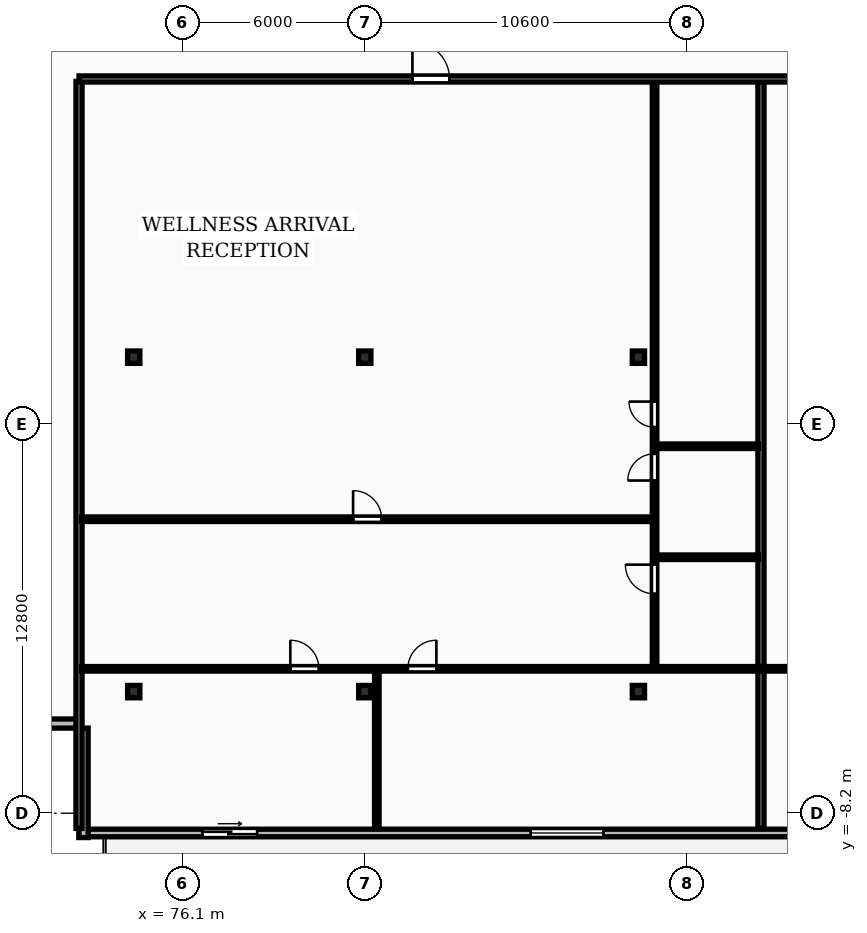
"""IFC4 building model, lengths in metres.
Left out: names, types, materials, properties, quantities, classifications, styles, units other than length and angle.
Written with IfcOpenShell. Run it as: python <this file> out.ifc"""

import sys

from ifc_helpers import new_model, si_unit, direction, frame, frame_2d, origin, origin_2d, place, context, subcontext, project, spatial, rectangle, i_section, extrude, element, fill, save


model = new_model("IFC4")
c1 = context("Model", 3, precision=1e-05, world=origin(), true_north=direction((0.0, 1.0)))
c2 = subcontext(c1, "Body", "Model", "MODEL_VIEW")
j1 = project(units=[si_unit("LENGTHUNIT", "METRE"), si_unit("PLANEANGLEUNIT", "RADIAN")], contexts=[c1])
p1 = place(None, origin())
s1 = spatial("IfcSite", under=j1, at=p1, CompositionType="ELEMENT")
p2 = place(p1, origin())
s2 = spatial("IfcBuilding", under=s1, at=p2, CompositionType="ELEMENT")
p3 = place(p2, frame((0.0, 0.0, 153.7)))
s3 = spatial("IfcBuildingStorey", under=s2, at=p3, CompositionType="ELEMENT", Elevation=153.7)
for number, where, z_axis, x_axis in (
    (1, (74.5, -4.2, 0.0), (0.0, 0.0, 1.0), (1.0, 0.0, 0.0)),
    (2, (74.5, 6.8, 0.0), (0.0, 0.0, 1.0), (1.0, 0.0, 0.0)),
    (3, (82.1, -4.2, 0.0), (0.0, 0.0, 1.0), (1.0, 0.0, 0.0)),
    (4, (82.1, 6.8, 0.0), (0.0, 0.0, 1.0), (1.0, 0.0, 0.0)),
    (5, (91.1, -4.2, 0.0), (0.0, 0.0, 1.0), (1.0, 0.0, 0.0)),
    (6, (91.1, 6.8, 0.0), (0.0, 0.0, 1.0), (1.0, 0.0, 0.0)),
):
    element("IfcColumn", number, at=place(p3, frame(where, z_axis=z_axis, x_axis=x_axis)), inside=s3, PredefinedType="COLUMN", context=c2, shape_type="SweptSolid", body=[
        extrude(i_section(OverallWidth=0.403, OverallDepth=0.406, WebThickness=0.027, FlangeThickness=0.043, FilletRadius=0.015, at=origin_2d()), origin(), (0.0, 0.0, 1.0), 3.6),
    ])
p4 = place(p3, frame((72.7, -8.85, 0.0), z_axis=(0.0, 0.0, 1.0), x_axis=(1.0, 0.0, 0.0)))
e7 = element("IfcWall", 7, at=p4, inside=s3, PredefinedType="STANDARD", context=c2, shape_type="SweptSolid", body=[
    extrude(rectangle(XDim=58.0, YDim=0.25, at=frame_2d((29.0, 0.0))), origin(), (0.0, 0.0, 1.0), 3.32),
])
p5 = place(p4, frame((4.058, 0.0, 0.0)))
e8 = element("IfcOpeningElement", 8, at=p5, cuts=e7, PredefinedType="OPENING", context=c2, shape_type="SweptSolid", body=[
    extrude(rectangle(XDim=1.8, YDim=2.2, at=frame_2d((0.9, 1.1))), frame((0.0, 0.135, 0.0), z_axis=(0.0, -1.0, 0.0), x_axis=(1.0, 0.0, 0.0)), (0.0, 0.0, 1.0), 0.27),
])
p6 = place(p4, frame((14.854, 0.0, 0.85)))
e9 = element("IfcOpeningElement", 9, at=p6, cuts=e7, PredefinedType="OPENING", context=c2, shape_type="SweptSolid", body=[
    extrude(rectangle(XDim=2.4, YDim=1.9, at=frame_2d((1.2, 0.95))), frame((0.0, 0.135, 0.0), z_axis=(0.0, -1.0, 0.0), x_axis=(1.0, 0.0, 0.0)), (0.0, 0.0, 1.0), 0.27),
])
p7 = place(p4, frame((26.191, 0.0, 0.0)))
e10 = element("IfcOpeningElement", 10, at=p7, cuts=e7, PredefinedType="OPENING", context=c2, shape_type="SweptSolid", body=[
    extrude(rectangle(XDim=1.8, YDim=2.2, at=frame_2d((0.9, 1.1))), frame((0.0, 0.135, 0.0), z_axis=(0.0, -1.0, 0.0), x_axis=(1.0, 0.0, 0.0)), (0.0, 0.0, 1.0), 0.27),
])
p8 = place(p4, frame((36.274, 0.0, 0.85)))
e11 = element("IfcOpeningElement", 11, at=p8, cuts=e7, PredefinedType="OPENING", context=c2, shape_type="SweptSolid", body=[
    extrude(rectangle(XDim=2.4, YDim=1.9, at=frame_2d((1.2, 0.95))), frame((0.0, 0.135, 0.0), z_axis=(0.0, -1.0, 0.0), x_axis=(1.0, 0.0, 0.0)), (0.0, 0.0, 1.0), 0.27),
])
p9 = place(p4, frame((48.039, 0.0, 0.0)))
e12 = element("IfcOpeningElement", 12, at=p9, cuts=e7, PredefinedType="OPENING", context=c2, shape_type="SweptSolid", body=[
    extrude(rectangle(XDim=1.8, YDim=2.2, at=frame_2d((0.9, 1.1))), frame((0.0, 0.135, 0.0), z_axis=(0.0, -1.0, 0.0), x_axis=(1.0, 0.0, 0.0)), (0.0, 0.0, 1.0), 0.27),
])
p10 = place(p4, frame((54.9, 0.0, 0.85)))
e13 = element("IfcOpeningElement", 13, at=p10, cuts=e7, PredefinedType="OPENING", context=c2, shape_type="SweptSolid", body=[
    extrude(rectangle(XDim=2.4, YDim=1.9, at=frame_2d((1.2, 0.95))), frame((0.0, 0.135, 0.0), z_axis=(0.0, -1.0, 0.0), x_axis=(1.0, 0.0, 0.0)), (0.0, 0.0, 1.0), 0.27),
])
p11 = place(p3, frame((69.1, -5.25, 0.0), z_axis=(0.0, 0.0, 1.0), x_axis=(1.0, 0.0, 0.0)))
e14 = element("IfcWall", 14, at=p11, inside=s3, PredefinedType="STANDARD", context=c2, shape_type="SweptSolid", body=[
    extrude(rectangle(XDim=3.6, YDim=0.3, at=frame_2d((1.8, 0.0))), origin(), (0.0, 0.0, 1.0), 3.32),
])
p12 = place(p3, frame((72.85, -5.4, 0.0), z_axis=(0.0, 0.0, 1.0), x_axis=(0.0, -1.0, 0.0)))
e15 = element("IfcWall", 15, at=p12, inside=s3, PredefinedType="STANDARD", context=c2, shape_type="SweptSolid", body=[
    extrude(rectangle(XDim=3.6, YDim=0.3, at=frame_2d((1.8, 0.0))), origin(), (0.0, 0.0, 1.0), 3.32),
])
for number, where, z_axis, x_axis in (
    (16, (72.7, -8.7, 0.0), (0.0, 0.0, 1.0), (0.0, 1.0, 0.0)),
    (17, (95.132, -8.7, 0.0), (0.0, 0.0, 1.0), (0.0, 1.0, 0.0)),
):
    element("IfcWall", number, at=place(p3, frame(where, z_axis=z_axis, x_axis=x_axis)), inside=s3, PredefinedType="PARTITIONING", context=c2, shape_type="SweptSolid", body=[
        extrude(rectangle(XDim=24.57, YDim=0.2, at=frame_2d((12.285, 0.0))), origin(), (0.0, 0.0, 1.0), 3.32),
    ])
p13 = place(p3, frame((72.78, 1.47, 0.0), z_axis=(0.0, 0.0, 1.0), x_axis=(1.0, 0.0, 0.0)))
e18 = element("IfcWall", 18, at=p13, inside=s3, PredefinedType="PARTITIONING", context=c2, shape_type="SweptSolid", body=[
    extrude(rectangle(XDim=18.812, YDim=0.15, at=frame_2d((9.406, 0.0))), origin(), (0.0, 0.0, 1.0), 3.32),
])
p14 = place(p13, frame((8.936, 0.0, 0.0)))
e19 = element("IfcOpeningElement", 19, at=p14, cuts=e18, PredefinedType="OPENING", context=c2, shape_type="SweptSolid", body=[
    extrude(rectangle(XDim=0.94, YDim=2.1, at=frame_2d((0.47, 1.05))), frame((0.0, 0.085, 0.0), z_axis=(0.0, -1.0, 0.0), x_axis=(1.0, 0.0, 0.0)), (0.0, 0.0, 1.0), 0.17),
])
for number, where, z_axis, x_axis in (
    (20, (91.691, 0.22, 0.0), (0.0, 0.0, 1.0), (1.0, 0.0, 0.0)),
    (21, (91.691, 3.87, 0.0), (0.0, 0.0, 1.0), (1.0, 0.0, 0.0)),
):
    element("IfcWall", number, at=place(p3, frame(where, z_axis=z_axis, x_axis=x_axis)), inside=s3, PredefinedType="PARTITIONING", context=c2, shape_type="SweptSolid", body=[
        extrude(rectangle(XDim=3.36, YDim=0.15, at=frame_2d((1.68, 0.0))), origin(), (0.0, 0.0, 1.0), 3.32),
    ])
p15 = place(p3, frame((91.632, -3.39, 0.0), z_axis=(0.0, 0.0, 1.0), x_axis=(0.0, 1.0, 0.0)))
e22 = element("IfcWall", 22, at=p15, inside=s3, PredefinedType="PARTITIONING", context=c2, shape_type="SweptSolid", body=[
    extrude(rectangle(XDim=19.28, YDim=0.15, at=frame_2d((9.64, 0.0))), origin(), (0.0, 0.0, 1.0), 3.32),
])
p16 = place(p15, frame((2.406, 0.0, 0.0)))
e23 = element("IfcOpeningElement", 23, at=p16, cuts=e22, PredefinedType="OPENING", context=c2, shape_type="SweptSolid", body=[
    extrude(rectangle(XDim=0.96, YDim=2.1, at=frame_2d((0.48, 1.05))), frame((0.0, 0.085, 0.0), z_axis=(0.0, -1.0, 0.0), x_axis=(1.0, 0.0, 0.0)), (0.0, 0.0, 1.0), 0.17),
])
p17 = place(p15, frame((6.133, 0.0, 0.0)))
e24 = element("IfcOpeningElement", 24, at=p17, cuts=e22, PredefinedType="OPENING", context=c2, shape_type="SweptSolid", body=[
    extrude(rectangle(XDim=0.88, YDim=2.06, at=frame_2d((0.44, 1.03))), frame((0.0, 0.085, 0.0), z_axis=(0.0, -1.0, 0.0), x_axis=(1.0, 0.0, 0.0)), (0.0, 0.0, 1.0), 0.17),
])
p18 = place(p15, frame((7.889, 0.0, 0.0)))
e25 = element("IfcOpeningElement", 25, at=p18, cuts=e22, PredefinedType="OPENING", context=c2, shape_type="SweptSolid", body=[
    extrude(rectangle(XDim=0.84, YDim=2.04, at=frame_2d((0.42, 1.02))), frame((0.0, 0.085, 0.0), z_axis=(0.0, -1.0, 0.0), x_axis=(1.0, 0.0, 0.0)), (0.0, 0.0, 1.0), 0.17),
])
p19 = place(p3, frame((82.496, -8.7, 0.0), z_axis=(0.0, 0.0, 1.0), x_axis=(0.0, 1.0, 0.0)))
e26 = element("IfcWall", 26, at=p19, inside=s3, PredefinedType="PARTITIONING", context=c2, shape_type="SweptSolid", body=[
    extrude(rectangle(XDim=5.17, YDim=0.15, at=frame_2d((2.585, 0.0))), origin(), (0.0, 0.0, 1.0), 3.32),
])
p20 = place(p3, frame((72.78, -3.45, 0.0), z_axis=(0.0, 0.0, 1.0), x_axis=(1.0, 0.0, 0.0)))
e27 = element("IfcWall", 27, at=p20, inside=s3, PredefinedType="PARTITIONING", context=c2, shape_type="SweptSolid", body=[
    extrude(rectangle(XDim=22.271, YDim=0.15, at=frame_2d((11.136, 0.0))), origin(), (0.0, 0.0, 1.0), 3.32),
])
p21 = place(p20, frame((6.871, 0.0, 0.0)))
e28 = element("IfcOpeningElement", 28, at=p21, cuts=e27, PredefinedType="OPENING", context=c2, shape_type="SweptSolid", body=[
    extrude(rectangle(XDim=0.94, YDim=2.1, at=frame_2d((0.47, 1.05))), frame((0.0, 0.085, 0.0), z_axis=(0.0, -1.0, 0.0), x_axis=(1.0, 0.0, 0.0)), (0.0, 0.0, 1.0), 0.17),
])
p22 = place(p20, frame((10.735, 0.0, 0.0)))
e29 = element("IfcOpeningElement", 29, at=p22, cuts=e27, PredefinedType="OPENING", context=c2, shape_type="SweptSolid", body=[
    extrude(rectangle(XDim=0.94, YDim=2.1, at=frame_2d((0.47, 1.05))), frame((0.0, 0.085, 0.0), z_axis=(0.0, -1.0, 0.0), x_axis=(1.0, 0.0, 0.0)), (0.0, 0.0, 1.0), 0.17),
])
p23 = place(p3, frame((95.211, -3.45, 0.0), z_axis=(0.0, 0.0, 1.0), x_axis=(1.0, 0.0, 0.0)))
e30 = element("IfcWall", 30, at=p23, inside=s3, PredefinedType="PARTITIONING", context=c2, shape_type="SweptSolid", body=[
    extrude(rectangle(XDim=20.847, YDim=0.15, at=frame_2d((10.423, 0.0))), origin(), (0.0, 0.0, 1.0), 3.32),
])
p24 = place(p23, frame((7.928, 0.0, 0.0)))
e31 = element("IfcOpeningElement", 31, at=p24, cuts=e30, PredefinedType="OPENING", context=c2, shape_type="SweptSolid", body=[
    extrude(rectangle(XDim=0.94, YDim=2.1, at=frame_2d((0.47, 1.05))), frame((0.0, 0.085, 0.0), z_axis=(0.0, -1.0, 0.0), x_axis=(1.0, 0.0, 0.0)), (0.0, 0.0, 1.0), 0.17),
])
p25 = place(p23, frame((9.953, 0.0, 0.0)))
e32 = element("IfcOpeningElement", 32, at=p25, cuts=e30, PredefinedType="OPENING", context=c2, shape_type="SweptSolid", body=[
    extrude(rectangle(XDim=0.94, YDim=2.1, at=frame_2d((0.47, 1.05))), frame((0.0, 0.085, 0.0), z_axis=(0.0, -1.0, 0.0), x_axis=(1.0, 0.0, 0.0)), (0.0, 0.0, 1.0), 0.17),
])
p26 = place(p3, frame((72.7, 15.95, 0.0), z_axis=(0.0, 0.0, 1.0), x_axis=(1.0, 0.0, 0.0)))
e33 = element("IfcWall", 33, at=p26, inside=s3, PredefinedType="PARTITIONING", context=c2, shape_type="SweptSolid", body=[
    extrude(rectangle(XDim=58.0, YDim=0.2, at=frame_2d((29.0, 0.0))), origin(), (0.0, 0.0, 1.0), 3.32),
])
p27 = place(p26, frame((10.967, 0.0, 0.0)))
e34 = element("IfcOpeningElement", 34, at=p27, cuts=e33, PredefinedType="OPENING", context=c2, shape_type="SweptSolid", body=[
    extrude(rectangle(XDim=1.22, YDim=2.18, at=frame_2d((0.61, 1.09))), frame((0.0, 0.11, 0.0), z_axis=(0.0, -1.0, 0.0), x_axis=(1.0, 0.0, 0.0)), (0.0, 0.0, 1.0), 0.22),
])
p28 = place(p26, frame((31.36, 0.0, 0.0)))
e35 = element("IfcOpeningElement", 35, at=p28, cuts=e33, PredefinedType="OPENING", context=c2, shape_type="SweptSolid", body=[
    extrude(rectangle(XDim=1.22, YDim=2.18, at=frame_2d((0.61, 1.09))), frame((0.0, 0.11, 0.0), z_axis=(0.0, -1.0, 0.0), x_axis=(1.0, 0.0, 0.0)), (0.0, 0.0, 1.0), 0.22),
])
p29 = place(p26, frame((45.483, 0.0, 0.0)))
e36 = element("IfcOpeningElement", 36, at=p29, cuts=e33, PredefinedType="OPENING", context=c2, shape_type="SweptSolid", body=[
    extrude(rectangle(XDim=0.95, YDim=2.15, at=frame_2d((0.475, 1.075))), frame((0.0, 0.11, 0.0), z_axis=(0.0, -1.0, 0.0), x_axis=(1.0, 0.0, 0.0)), (0.0, 0.0, 1.0), 0.22),
])
p30 = place(p5, origin())
e37 = element("IfcDoor", 37, at=p30, inside=s3, OperationType="SLIDING_TO_RIGHT", PredefinedType="DOOR", context=c2, shape_type="SweptSolid", body=[
    extrude(rectangle(XDim=1.8, YDim=2.2, at=frame_2d((0.9, 1.1))), frame((0.0, 0.025, 0.0), z_axis=(0.0, -1.0, 0.0), x_axis=(1.0, 0.0, 0.0)), (0.0, 0.0, 1.0), 0.05),
])
fill(e8, e37)
p31 = place(p6, origin())
e38 = element("IfcWindow", 38, at=p31, inside=s3, PartitioningType="DOUBLE_PANEL_VERTICAL", PredefinedType="WINDOW", context=c2, shape_type="SweptSolid", body=[
    extrude(rectangle(XDim=2.4, YDim=1.9, at=frame_2d((1.2, 0.95))), frame((0.0, 0.03, 0.0), z_axis=(0.0, -1.0, 0.0), x_axis=(1.0, 0.0, 0.0)), (0.0, 0.0, 1.0), 0.06),
])
fill(e9, e38)
p32 = place(p14, origin())
e39 = element("IfcDoor", 39, at=p32, inside=s3, OperationType="SINGLE_SWING_LEFT", PredefinedType="DOOR", context=c2, shape_type="SweptSolid", body=[
    extrude(rectangle(XDim=0.94, YDim=2.1, at=frame_2d((0.47, 1.05))), frame((0.0, 0.025, 0.0), z_axis=(0.0, -1.0, 0.0), x_axis=(1.0, 0.0, 0.0)), (0.0, 0.0, 1.0), 0.05),
])
fill(e19, e39)
p33 = place(p16, origin())
e40 = element("IfcDoor", 40, at=p33, inside=s3, OperationType="SINGLE_SWING_RIGHT", PredefinedType="DOOR", context=c2, shape_type="SweptSolid", body=[
    extrude(rectangle(XDim=0.96, YDim=2.1, at=frame_2d((0.48, 1.05))), frame((0.0, 0.025, 0.0), z_axis=(0.0, -1.0, 0.0), x_axis=(1.0, 0.0, 0.0)), (0.0, 0.0, 1.0), 0.05),
])
fill(e23, e40)
p34 = place(p17, origin())
e41 = element("IfcDoor", 41, at=p34, inside=s3, OperationType="SINGLE_SWING_LEFT", PredefinedType="DOOR", context=c2, shape_type="SweptSolid", body=[
    extrude(rectangle(XDim=0.88, YDim=2.06, at=frame_2d((0.44, 1.03))), frame((0.0, 0.025, 0.0), z_axis=(0.0, -1.0, 0.0), x_axis=(1.0, 0.0, 0.0)), (0.0, 0.0, 1.0), 0.05),
])
fill(e24, e41)
p35 = place(p18, origin())
e42 = element("IfcDoor", 42, at=p35, inside=s3, OperationType="SINGLE_SWING_RIGHT", PredefinedType="DOOR", context=c2, shape_type="SweptSolid", body=[
    extrude(rectangle(XDim=0.84, YDim=2.04, at=frame_2d((0.42, 1.02))), frame((0.0, 0.025, 0.0), z_axis=(0.0, -1.0, 0.0), x_axis=(1.0, 0.0, 0.0)), (0.0, 0.0, 1.0), 0.05),
])
fill(e25, e42)
p36 = place(p21, origin())
e43 = element("IfcDoor", 43, at=p36, inside=s3, OperationType="SINGLE_SWING_LEFT", PredefinedType="DOOR", context=c2, shape_type="SweptSolid", body=[
    extrude(rectangle(XDim=0.94, YDim=2.1, at=frame_2d((0.47, 1.05))), frame((0.0, 0.025, 0.0), z_axis=(0.0, -1.0, 0.0), x_axis=(1.0, 0.0, 0.0)), (0.0, 0.0, 1.0), 0.05),
])
fill(e28, e43)
p37 = place(p22, origin())
e44 = element("IfcDoor", 44, at=p37, inside=s3, OperationType="SINGLE_SWING_RIGHT", PredefinedType="DOOR", context=c2, shape_type="SweptSolid", body=[
    extrude(rectangle(XDim=0.94, YDim=2.1, at=frame_2d((0.47, 1.05))), frame((0.0, 0.025, 0.0), z_axis=(0.0, -1.0, 0.0), x_axis=(1.0, 0.0, 0.0)), (0.0, 0.0, 1.0), 0.05),
])
fill(e29, e44)
p38 = place(p27, origin())
e45 = element("IfcDoor", 45, at=p38, inside=s3, OperationType="SINGLE_SWING_LEFT", PredefinedType="DOOR", context=c2, shape_type="SweptSolid", body=[
    extrude(rectangle(XDim=1.22, YDim=2.18, at=frame_2d((0.61, 1.09))), frame((0.0, 0.025, 0.0), z_axis=(0.0, -1.0, 0.0), x_axis=(1.0, 0.0, 0.0)), (0.0, 0.0, 1.0), 0.05),
])
fill(e34, e45)
save(model, sys.argv[1])
